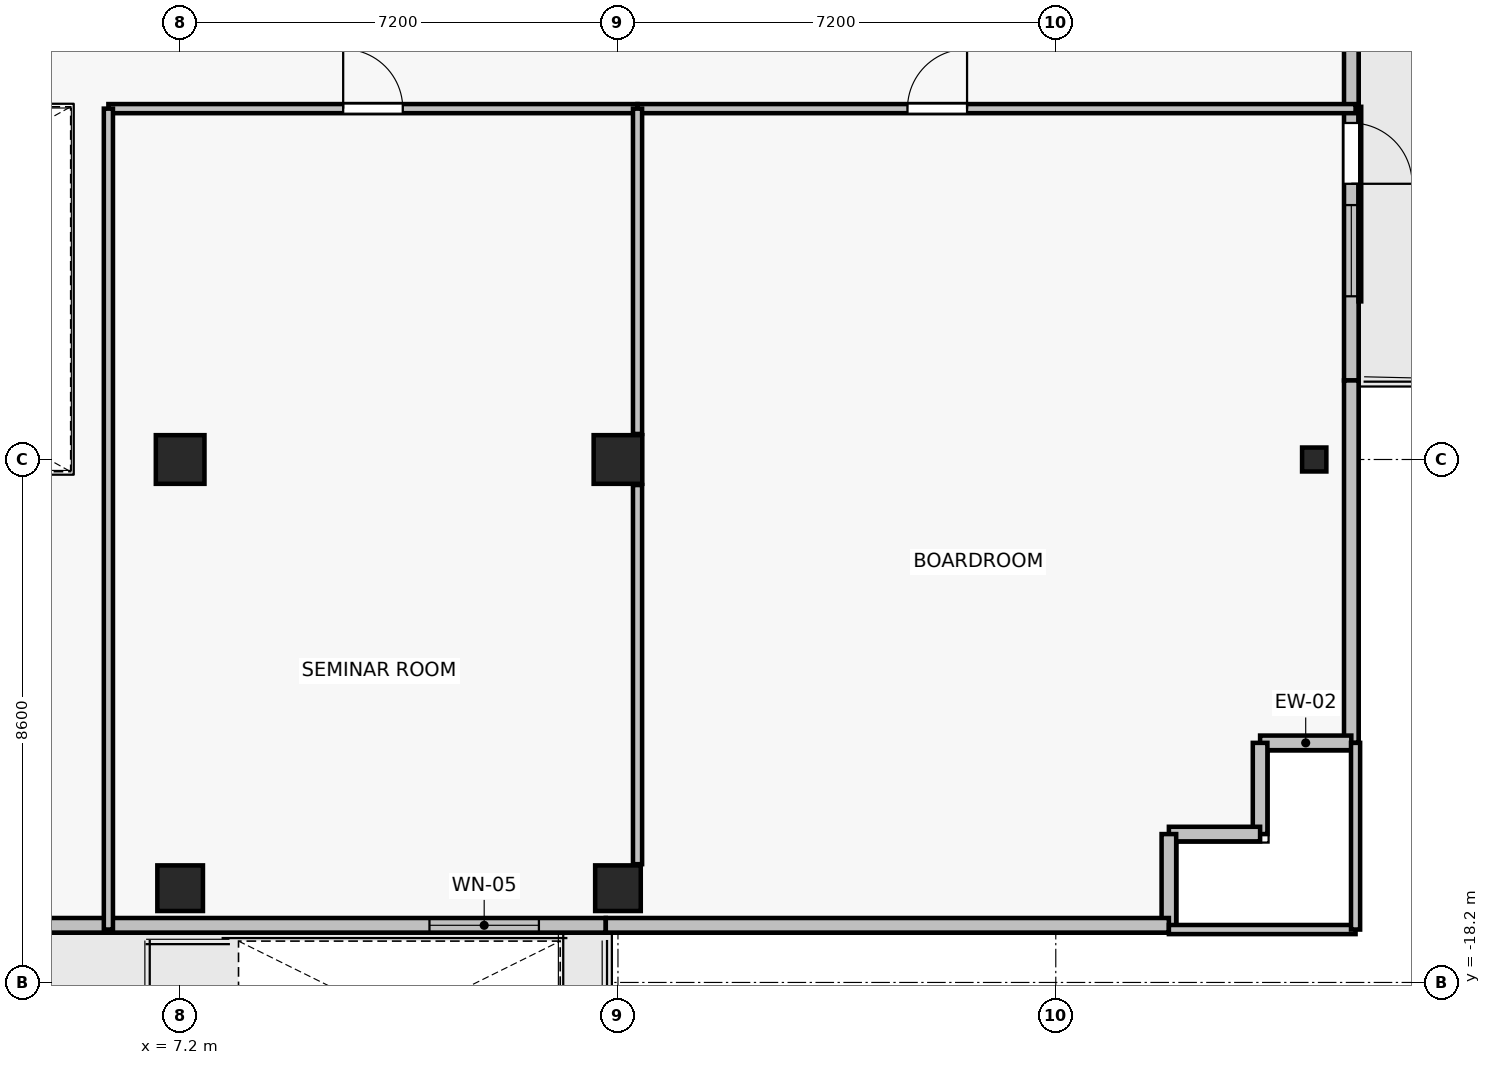
"""IFC4 building model, lengths in metres.
Left out: names, types, materials, properties, quantities, classifications, styles, units other than length and angle.
Written with IfcOpenShell. Run it as: python <this file> out.ifc"""

import sys

from ifc_helpers import new_model, si_unit, direction, frame, frame_2d, origin, origin_2d, place, context, subcontext, project, spatial, rectangle, i_section, extrude, source, transform, mapped, element, fill, save


model = new_model("IFC4")
c1 = context("Model", 3, precision=1e-05, world=origin(), true_north=direction((0.0, 1.0)))
c2 = subcontext(c1, "Body", "Model", "MODEL_VIEW")
j1 = project(units=[si_unit("LENGTHUNIT", "METRE"), si_unit("PLANEANGLEUNIT", "RADIAN")], contexts=[c1])
p1 = place(None, origin())
s1 = spatial("IfcSite", under=j1, at=p1, CompositionType="ELEMENT")
p2 = place(p1, origin())
s2 = spatial("IfcBuilding", under=s1, at=p2, CompositionType="ELEMENT")
p3 = place(p2, frame((0.0, 0.0, 175.9)))
s3 = spatial("IfcBuildingStorey", under=s2, at=p3, CompositionType="ELEMENT", Elevation=175.9)
for number, where, z_axis, x_axis in (
    (1, (7.2, -9.6, 0.0), (0.0, 0.0, 1.0), (1.0, 0.0, 0.0)),
    (2, (14.4, -9.6, 0.0), (0.0, 0.0, 1.0), (1.0, 0.0, 0.0)),
):
    element("IfcColumn", number, at=place(p3, frame(where, z_axis=z_axis, x_axis=x_axis)), inside=s3, PredefinedType="COLUMN", context=c2, shape_type="SweptSolid", body=[
        extrude(rectangle(XDim=0.8, YDim=0.8, at=origin_2d()), origin(), (0.0, 0.0, 1.0), 3.3),
    ])
for number, where, z_axis, x_axis in (
    (3, (7.2, -16.65, 0.0), (0.0, 0.0, 1.0), (1.0, 0.0, 0.0)),
    (4, (14.4, -16.65, 0.0), (0.0, 0.0, 1.0), (1.0, 0.0, 0.0)),
):
    element("IfcColumn", number, at=place(p3, frame(where, z_axis=z_axis, x_axis=x_axis)), inside=s3, PredefinedType="COLUMN", context=c2, shape_type="SweptSolid", body=[
        extrude(rectangle(XDim=0.75, YDim=0.75, at=origin_2d()), origin(), (0.0, 0.0, 1.0), 3.3),
    ])
p4 = place(p3, frame((25.85, -9.6, 0.0), z_axis=(0.0, 0.0, 1.0), x_axis=(1.0, 0.0, 0.0)))
e5 = element("IfcColumn", 5, at=p4, inside=s3, PredefinedType="COLUMN", context=c2, shape_type="SweptSolid", body=[
    extrude(i_section(OverallWidth=0.399, OverallDepth=0.394, WebThickness=0.023, FlangeThickness=0.037, FilletRadius=0.015, at=origin_2d()), origin(), (0.0, 0.0, 1.0), 3.3),
])
p5 = place(p3, frame((26.46, -2.5, 0.0), z_axis=(0.0, 0.0, 1.0), x_axis=(0.0, -1.0, 0.0)))
e6 = element("IfcWall", 6, at=p5, inside=s3, PredefinedType="SOLIDWALL", context=c2, shape_type="SweptSolid", body=[
    extrude(rectangle(XDim=5.8, YDim=0.24, at=frame_2d((2.9, 0.0))), origin(), (0.0, 0.0, 1.0), 3.075),
])
p6 = place(p5, frame((1.566, 0.0, 0.0)))
e7 = element("IfcOpeningElement", 7, at=p6, cuts=e6, PredefinedType="OPENING", context=c2, shape_type="SweptSolid", body=[
    extrude(rectangle(XDim=1.0, YDim=2.2, at=frame_2d((0.5, 1.1))), frame((0.0, 0.13, 0.0), z_axis=(0.0, -1.0, 0.0), x_axis=(1.0, 0.0, 0.0)), (0.0, 0.0, 1.0), 0.26),
])
p7 = place(p5, frame((2.916, 0.0, 0.85)))
e8 = element("IfcOpeningElement", 8, at=p7, cuts=e6, PredefinedType="OPENING", context=c2, shape_type="SweptSolid", body=[
    extrude(rectangle(XDim=1.5, YDim=1.6, at=frame_2d((0.75, 0.8))), frame((0.0, 0.13, 0.0), z_axis=(0.0, -1.0, 0.0), x_axis=(1.0, 0.0, 0.0)), (0.0, 0.0, 1.0), 0.26),
])
p8 = place(p3, frame((14.2, -17.26, 0.0), z_axis=(0.0, 0.0, 1.0), x_axis=(-1.0, 0.0, 0.0)))
e9 = element("IfcWall", 9, at=p8, inside=s3, PredefinedType="SOLIDWALL", context=c2, shape_type="SweptSolid", body=[
    extrude(rectangle(XDim=11.0, YDim=0.24, at=frame_2d((5.5, 0.0))), origin(), (0.0, 0.0, 1.0), 2.665),
])
p9 = place(p8, frame((9.25, 0.0, 0.0)))
e10 = element("IfcOpeningElement", 10, at=p9, cuts=e9, PredefinedType="OPENING", context=c2, shape_type="SweptSolid", body=[
    extrude(rectangle(XDim=1.5, YDim=2.2, at=frame_2d((0.75, 1.1))), frame((0.0, 0.13, 0.0), z_axis=(0.0, -1.0, 0.0), x_axis=(1.0, 0.0, 0.0)), (0.0, 0.0, 1.0), 0.26),
])
p10 = place(p8, frame((1.1, 0.0, 0.85)))
e11 = element("IfcOpeningElement", 11, at=p10, cuts=e9, PredefinedType="OPENING", context=c2, shape_type="SweptSolid", body=[
    extrude(rectangle(XDim=1.8, YDim=1.6, at=frame_2d((0.9, 0.8))), frame((0.0, 0.13, 0.0), z_axis=(0.0, -1.0, 0.0), x_axis=(1.0, 0.0, 0.0)), (0.0, 0.0, 1.0), 0.26),
])
p11 = place(p3, frame((26.46, -14.26, 0.0), z_axis=(0.0, 0.0, 1.0), x_axis=(0.0, 1.0, 0.0)))
e12 = element("IfcWall", 12, at=p11, inside=s3, PredefinedType="SOLIDWALL", context=c2, shape_type="SweptSolid", body=[
    extrude(rectangle(XDim=5.96, YDim=0.24, at=frame_2d((2.98, 0.0))), origin(), (0.0, 0.0, 1.0), 3.075),
])
for number, where, z_axis, x_axis in (
    (13, (24.96, -14.26, 0.0), (0.0, 0.0, 1.0), (1.0, 0.0, 0.0)),
    (14, (24.96, -15.76, 0.0), (0.0, 0.0, 1.0), (0.0, 1.0, 0.0)),
    (15, (23.46, -15.76, 0.0), (0.0, 0.0, 1.0), (1.0, 0.0, 0.0)),
    (16, (23.46, -17.26, 0.0), (0.0, 0.0, 1.0), (0.0, 1.0, 0.0)),
):
    element("IfcWall", number, at=place(p3, frame(where, z_axis=z_axis, x_axis=x_axis)), inside=s3, PredefinedType="SOLIDWALL", context=c2, shape_type="SweptSolid", body=[
        extrude(rectangle(XDim=1.5, YDim=0.24, at=frame_2d((0.75, 0.0))), origin(), (0.0, 0.0, 1.0), 3.075),
    ])
p12 = place(p3, frame((14.2, -17.26, 0.0), z_axis=(0.0, 0.0, 1.0), x_axis=(1.0, 0.0, 0.0)))
e17 = element("IfcWall", 17, at=p12, inside=s3, PredefinedType="SOLIDWALL", context=c2, shape_type="SweptSolid", body=[
    extrude(rectangle(XDim=9.26, YDim=0.24, at=frame_2d((4.63, 0.0))), origin(), (0.0, 0.0, 1.0), 3.075),
])
p13 = place(p3, frame((6.02, -3.83, 0.0), z_axis=(0.0, 0.0, 1.0), x_axis=(1.0, 0.0, 0.0)))
e18 = element("IfcWall", 18, at=p13, inside=s3, PredefinedType="PARTITIONING", context=c2, shape_type="SweptSolid", body=[
    extrude(rectangle(XDim=8.702, YDim=0.15, at=frame_2d((4.351, 0.0))), origin(), (0.0, 0.0, 1.0), 2.565),
])
p14 = place(p13, frame((3.861, 0.0, 0.0)))
e19 = element("IfcOpeningElement", 19, at=p14, cuts=e18, PredefinedType="OPENING", context=c2, shape_type="SweptSolid", body=[
    extrude(rectangle(XDim=0.98, YDim=2.15, at=frame_2d((0.49, 1.075))), frame((0.0, 0.085, 0.0), z_axis=(0.0, -1.0, 0.0), x_axis=(1.0, 0.0, 0.0)), (0.0, 0.0, 1.0), 0.17),
])
p15 = place(p3, frame((6.02, -17.33, 0.0), z_axis=(0.0, 0.0, 1.0), x_axis=(0.0, 1.0, 0.0)))
e20 = element("IfcWall", 20, at=p15, inside=s3, PredefinedType="PARTITIONING", context=c2, shape_type="SweptSolid", body=[
    extrude(rectangle(XDim=13.5, YDim=0.15, at=frame_2d((6.75, 0.0))), origin(), (0.0, 0.0, 1.0), 2.565),
])
p16 = place(p3, frame((14.722, -10.02, 0.0), z_axis=(0.0, 0.0, 1.0), x_axis=(0.0, -1.0, 0.0)))
e21 = element("IfcWall", 21, at=p16, inside=s3, PredefinedType="PARTITIONING", context=c2, shape_type="SweptSolid", body=[
    extrude(rectangle(XDim=6.235, YDim=0.15, at=frame_2d((3.117, 0.0))), origin(), (0.0, 0.0, 1.0), 3.075),
])
p17 = place(p3, frame((26.53, -17.33, 0.0), z_axis=(0.0, 0.0, 1.0), x_axis=(-1.0, 0.0, 0.0)))
e22 = element("IfcWall", 22, at=p17, inside=s3, PredefinedType="PARTITIONING", context=c2, shape_type="SweptSolid", body=[
    extrude(rectangle(XDim=3.07, YDim=0.15, at=frame_2d((1.535, 0.0))), origin(), (0.0, 0.0, 1.0), 3.075),
])
p18 = place(p3, frame((14.722, -3.83, 0.0), z_axis=(0.0, 0.0, 1.0), x_axis=(1.0, 0.0, 0.0)))
e23 = element("IfcWall", 23, at=p18, inside=s3, PredefinedType="PARTITIONING", context=c2, shape_type="SweptSolid", body=[
    extrude(rectangle(XDim=11.808, YDim=0.15, at=frame_2d((5.904, 0.0))), origin(), (0.0, 0.0, 1.0), 2.565),
])
p19 = place(p18, frame((4.439, 0.0, 0.0)))
e24 = element("IfcOpeningElement", 24, at=p19, cuts=e23, PredefinedType="OPENING", context=c2, shape_type="SweptSolid", body=[
    extrude(rectangle(XDim=0.98, YDim=2.15, at=frame_2d((0.49, 1.075))), frame((0.0, 0.085, 0.0), z_axis=(0.0, -1.0, 0.0), x_axis=(1.0, 0.0, 0.0)), (0.0, 0.0, 1.0), 0.17),
])
p20 = place(p3, frame((14.722, -9.18, 0.0), z_axis=(0.0, 0.0, 1.0), x_axis=(0.0, 1.0, 0.0)))
e25 = element("IfcWall", 25, at=p20, inside=s3, PredefinedType="PARTITIONING", context=c2, shape_type="SweptSolid", body=[
    extrude(rectangle(XDim=5.35, YDim=0.15, at=frame_2d((2.675, 0.0))), origin(), (0.0, 0.0, 1.0), 3.075),
])
p21 = place(p3, frame((26.53, -14.26, 0.0), z_axis=(0.0, 0.0, 1.0), x_axis=(0.0, -1.0, 0.0)))
e26 = element("IfcWall", 26, at=p21, inside=s3, PredefinedType="PARTITIONING", context=c2, shape_type="SweptSolid", body=[
    extrude(rectangle(XDim=3.07, YDim=0.15, at=frame_2d((1.535, 0.0))), origin(), (0.0, 0.0, 1.0), 3.075),
])
m1 = source(origin(), c2, "Body", "SweptSolid", [
    extrude(rectangle(XDim=1.0, YDim=2.2, at=frame_2d((0.5, 1.1))), frame((0.0, 0.025, 0.0), z_axis=(0.0, -1.0, 0.0), x_axis=(1.0, 0.0, 0.0)), (0.0, 0.0, 1.0), 0.05),
])
p22 = place(p6, origin())
e27 = element("IfcDoor", 27, at=p22, inside=s3, OperationType="SINGLE_SWING_RIGHT", PredefinedType="DOOR", context=c2, shape_type="MappedRepresentation", body=[
    mapped(m1, transform((0.0, 0.0, 0.0), x_axis=(1.0, 0.0, 0.0), y_axis=(0.0, 1.0, 0.0), z_axis=(0.0, 0.0, 1.0), scale=1.0)),
])
fill(e7, e27)
m2 = source(origin(), c2, "Body", "SweptSolid", [
    extrude(rectangle(XDim=1.5, YDim=1.6, at=frame_2d((0.75, 0.8))), frame((0.0, 0.03, 0.0), z_axis=(0.0, -1.0, 0.0), x_axis=(1.0, 0.0, 0.0)), (0.0, 0.0, 1.0), 0.06),
])
p23 = place(p7, origin())
e28 = element("IfcWindow", 28, at=p23, inside=s3, PartitioningType="SINGLE_PANEL", PredefinedType="WINDOW", context=c2, shape_type="MappedRepresentation", body=[
    mapped(m2, transform((0.0, 0.0, 0.0), x_axis=(1.0, 0.0, 0.0), y_axis=(0.0, 1.0, 0.0), z_axis=(0.0, 0.0, 1.0), scale=1.0)),
])
fill(e8, e28)
m3 = source(origin(), c2, "Body", "SweptSolid", [
    extrude(rectangle(XDim=1.8, YDim=1.6, at=frame_2d((0.9, 0.8))), frame((0.0, 0.03, 0.0), z_axis=(0.0, -1.0, 0.0), x_axis=(1.0, 0.0, 0.0)), (0.0, 0.0, 1.0), 0.06),
])
p24 = place(p10, origin())
e29 = element("IfcWindow", 29, at=p24, inside=s3, PartitioningType="SINGLE_PANEL", PredefinedType="WINDOW", context=c2, shape_type="MappedRepresentation", body=[
    mapped(m3, transform((0.0, 0.0, 0.0), x_axis=(1.0, 0.0, 0.0), y_axis=(0.0, 1.0, 0.0), z_axis=(0.0, 0.0, 1.0), scale=1.0)),
])
fill(e11, e29)
m4 = source(origin(), c2, "Body", "SweptSolid", [
    extrude(rectangle(XDim=0.98, YDim=2.15, at=frame_2d((0.49, 1.075))), frame((0.0, 0.025, 0.0), z_axis=(0.0, -1.0, 0.0), x_axis=(1.0, 0.0, 0.0)), (0.0, 0.0, 1.0), 0.05),
])
p25 = place(p14, origin())
e30 = element("IfcDoor", 30, at=p25, inside=s3, OperationType="SINGLE_SWING_LEFT", PredefinedType="DOOR", context=c2, shape_type="MappedRepresentation", body=[
    mapped(m4, transform((0.0, 0.0, 0.0), x_axis=(1.0, 0.0, 0.0), y_axis=(0.0, 1.0, 0.0), z_axis=(0.0, 0.0, 1.0), scale=1.0)),
])
fill(e19, e30)
p26 = place(p19, origin())
e31 = element("IfcDoor", 31, at=p26, inside=s3, OperationType="SINGLE_SWING_RIGHT", PredefinedType="DOOR", context=c2, shape_type="MappedRepresentation", body=[
    mapped(m4, transform((0.0, 0.0, 0.0), x_axis=(1.0, 0.0, 0.0), y_axis=(0.0, 1.0, 0.0), z_axis=(0.0, 0.0, 1.0), scale=1.0)),
])
fill(e24, e31)
save(model, sys.argv[1])
